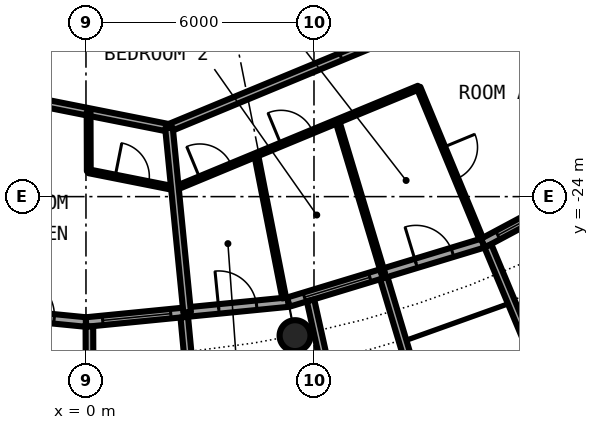
"""IFC4 building model, lengths in metres.
Left out: names, types, materials, properties, quantities, classifications, styles, units other than length and angle.
Written with IfcOpenShell. Run it as: python <this file> out.ifc"""

import sys

from ifc_helpers import new_model, si_unit, direction, frame, frame_2d, origin, origin_2d, place, context, subcontext, project, spatial, rectangle, hollow_circle, extrude, element, fill, save


model = new_model("IFC4")
c1 = context("Model", 3, precision=1e-05, world=origin(), true_north=direction((0.0, 1.0)))
c2 = subcontext(c1, "Body", "Model", "MODEL_VIEW")
j1 = project(units=[si_unit("LENGTHUNIT", "METRE"), si_unit("PLANEANGLEUNIT", "RADIAN")], contexts=[c1])
p1 = place(None, origin())
s1 = spatial("IfcSite", under=j1, at=p1, CompositionType="ELEMENT")
p2 = place(p1, origin())
s2 = spatial("IfcBuilding", under=s1, at=p2, CompositionType="ELEMENT")
p3 = place(p2, frame((0.0, 0.0, 145.2)))
s3 = spatial("IfcBuildingStorey", under=s2, at=p3, CompositionType="ELEMENT", Elevation=145.2)
p4 = place(p3, frame((5.501, -27.658, 0.0), z_axis=(0.0, 0.0, 1.0), x_axis=(1.0, 0.0, 0.0)))
e1 = element("IfcColumn", 1, at=p4, inside=s3, PredefinedType="COLUMN", context=c2, shape_type="SweptSolid", body=[
    extrude(hollow_circle(Radius=0.406, WallThickness=0.04, at=origin_2d()), origin(), (0.0, 0.0, 1.0), 3.05),
])
p5 = place(p3, frame((-5.326, -26.775, 0.0), z_axis=(0.0, 0.0, 1.0), x_axis=(0.995173996315, -0.098126026407, 0.0)))
e2 = element("IfcWall", 2, at=p5, inside=s3, PredefinedType="SOLIDWALL", context=c2, shape_type="SweptSolid", body=[
    extrude(rectangle(XDim=5.352, YDim=0.25, at=frame_2d((2.676, 0.0))), origin(), (0.0, 0.0, 1.0), 2.7),
])
p6 = place(p5, frame((0.441, 0.0, 0.3)))
e3 = element("IfcOpeningElement", 3, at=p6, cuts=e2, PredefinedType="OPENING", context=c2, shape_type="SweptSolid", body=[
    extrude(rectangle(XDim=1.8, YDim=2.1, at=frame_2d((0.9, 1.05))), frame((0.0, 0.135, 0.0), z_axis=(0.0, -1.0, 0.0), x_axis=(1.0, 0.0, 0.0)), (0.0, 0.0, 1.0), 0.27),
])
p7 = place(p5, frame((3.51, 0.0, 0.0)))
e4 = element("IfcOpeningElement", 4, at=p7, cuts=e2, PredefinedType="OPENING", context=c2, shape_type="SweptSolid", body=[
    extrude(rectangle(XDim=1.0, YDim=2.2, at=frame_2d((0.5, 1.1))), frame((0.0, 0.135, 0.0), z_axis=(0.0, -1.0, 0.0), x_axis=(1.0, 0.0, 0.0)), (0.0, 0.0, 1.0), 0.27),
])
p8 = place(p3, frame((0.0, -27.3, 0.0), z_axis=(0.0, 0.0, 1.0), x_axis=(0.995173996315, 0.098126026407, 0.0)))
e5 = element("IfcWall", 5, at=p8, inside=s3, PredefinedType="SOLIDWALL", context=c2, shape_type="SweptSolid", body=[
    extrude(rectangle(XDim=5.352, YDim=0.25, at=frame_2d((2.676, 0.0))), origin(), (0.0, 0.0, 1.0), 2.7),
])
p9 = place(p8, frame((0.441, 0.0, 0.3)))
e6 = element("IfcOpeningElement", 6, at=p9, cuts=e5, PredefinedType="OPENING", context=c2, shape_type="SweptSolid", body=[
    extrude(rectangle(XDim=1.8, YDim=2.1, at=frame_2d((0.9, 1.05))), frame((0.0, 0.135, 0.0), z_axis=(0.0, -1.0, 0.0), x_axis=(1.0, 0.0, 0.0)), (0.0, 0.0, 1.0), 0.27),
])
p10 = place(p8, frame((3.51, 0.0, 0.0)))
e7 = element("IfcOpeningElement", 7, at=p10, cuts=e5, PredefinedType="OPENING", context=c2, shape_type="SweptSolid", body=[
    extrude(rectangle(XDim=1.0, YDim=2.2, at=frame_2d((0.5, 1.1))), frame((0.0, 0.135, 0.0), z_axis=(0.0, -1.0, 0.0), x_axis=(1.0, 0.0, 0.0)), (0.0, 0.0, 1.0), 0.27),
])
p11 = place(p3, frame((0.09, -27.417, -0.03), z_axis=(0.0, 0.0, 1.0), x_axis=(0.00347308367, -0.999993968827, 0.0)))
e8 = element("IfcWall", 8, at=p11, inside=s3, PredefinedType="SOLIDWALL", context=c2, shape_type="SweptSolid", body=[
    extrude(rectangle(XDim=2.882, YDim=0.2, at=frame_2d((1.441, 0.0))), origin(), (0.0, 0.0, 1.0), 2.73),
])
p12 = place(p3, frame((2.586, -27.171, -0.03), z_axis=(0.0, 0.0, 1.0), x_axis=(0.094548432284, -0.995520262954, 0.0)))
e9 = element("IfcWall", 9, at=p12, inside=s3, PredefinedType="SOLIDWALL", context=c2, shape_type="SweptSolid", body=[
    extrude(rectangle(XDim=3.006, YDim=0.2, at=frame_2d((1.503, 0.0))), origin(), (0.0, 0.0, 1.0), 2.73),
])
p13 = place(p3, frame((5.326, -26.775, 0.0), z_axis=(0.0, 0.0, 1.0), x_axis=(0.956965678721, 0.290201119486, 0.0)))
e10 = element("IfcWall", 10, at=p13, inside=s3, PredefinedType="SOLIDWALL", context=c2, shape_type="SweptSolid", body=[
    extrude(rectangle(XDim=5.351, YDim=0.25, at=frame_2d((2.676, 0.0))), origin(), (0.0, 0.0, 1.0), 2.7),
])
p14 = place(p13, frame((0.441, 0.0, 0.3)))
e11 = element("IfcOpeningElement", 11, at=p14, cuts=e10, PredefinedType="OPENING", context=c2, shape_type="SweptSolid", body=[
    extrude(rectangle(XDim=1.8, YDim=2.1, at=frame_2d((0.9, 1.05))), frame((0.0, 0.135, 0.0), z_axis=(0.0, -1.0, 0.0), x_axis=(1.0, 0.0, 0.0)), (0.0, 0.0, 1.0), 0.27),
])
p15 = place(p13, frame((3.51, 0.0, 0.0)))
e12 = element("IfcOpeningElement", 12, at=p15, cuts=e10, PredefinedType="OPENING", context=c2, shape_type="SweptSolid", body=[
    extrude(rectangle(XDim=1.0, YDim=2.2, at=frame_2d((0.5, 1.1))), frame((0.0, 0.135, 0.0), z_axis=(0.0, -1.0, 0.0), x_axis=(1.0, 0.0, 0.0)), (0.0, 0.0, 1.0), 0.27),
])
p16 = place(p3, frame((5.909, -26.729, -0.03), z_axis=(0.0, 0.0, 1.0), x_axis=(0.216409053917, -0.976302781612, 0.0)))
e13 = element("IfcWall", 13, at=p16, inside=s3, PredefinedType="SOLIDWALL", context=c2, shape_type="SweptSolid", body=[
    extrude(rectangle(XDim=2.925, YDim=0.2, at=frame_2d((1.463, 0.0))), origin(), (0.0, 0.0, 1.0), 2.73),
])
p17 = place(p3, frame((7.837, -26.144, -0.03), z_axis=(0.0, 0.0, 1.0), x_axis=(0.287064767992, -0.957911174889, 0.0)))
e14 = element("IfcWall", 14, at=p17, inside=s3, PredefinedType="SOLIDWALL", context=c2, shape_type="SweptSolid", body=[
    extrude(rectangle(XDim=3.006, YDim=0.2, at=frame_2d((1.503, 0.0))), origin(), (0.0, 0.0, 1.0), 2.73),
])
p18 = place(p3, frame((10.447, -25.222, 0.0), z_axis=(0.0, 0.0, 1.0), x_axis=(0.881915646801, 0.471407246368, 0.0)))
e15 = element("IfcWall", 15, at=p18, inside=s3, PredefinedType="SOLIDWALL", context=c2, shape_type="SweptSolid", body=[
    extrude(rectangle(XDim=5.352, YDim=0.25, at=frame_2d((2.676, 0.0))), origin(), (0.0, 0.0, 1.0), 2.7),
])
p19 = place(p18, frame((0.441, 0.0, 0.3)))
e16 = element("IfcOpeningElement", 16, at=p19, cuts=e15, PredefinedType="OPENING", context=c2, shape_type="SweptSolid", body=[
    extrude(rectangle(XDim=1.8, YDim=2.1, at=frame_2d((0.9, 1.05))), frame((0.0, 0.135, 0.0), z_axis=(0.0, -1.0, 0.0), x_axis=(1.0, 0.0, 0.0)), (0.0, 0.0, 1.0), 0.27),
])
p20 = place(p18, frame((3.51, 0.0, 0.0)))
e17 = element("IfcOpeningElement", 17, at=p20, cuts=e15, PredefinedType="OPENING", context=c2, shape_type="SweptSolid", body=[
    extrude(rectangle(XDim=1.0, YDim=2.2, at=frame_2d((0.5, 1.1))), frame((0.0, 0.135, 0.0), z_axis=(0.0, -1.0, 0.0), x_axis=(1.0, 0.0, 0.0)), (0.0, 0.0, 1.0), 0.27),
])
p21 = place(p3, frame((10.575, -25.295, -0.03), z_axis=(0.0, 0.0, 1.0), x_axis=(0.385697364644, -0.922625353492, 0.0)))
e18 = element("IfcWall", 18, at=p21, inside=s3, PredefinedType="SOLIDWALL", context=c2, shape_type="SweptSolid", body=[
    extrude(rectangle(XDim=2.883, YDim=0.2, at=frame_2d((1.442, 0.0))), origin(), (0.0, 0.0, 1.0), 2.73),
])
p22 = place(p3, frame((0.074, -23.334, 0.0), z_axis=(0.0, 0.0, 1.0), x_axis=(0.98081942231, -0.194918600496, 0.0)))
e19 = element("IfcWall", 19, at=p22, inside=s3, PredefinedType="PARTITIONING", context=c2, shape_type="SweptSolid", body=[
    extrude(rectangle(XDim=2.313, YDim=0.1, at=frame_2d((1.157, 0.0))), origin(), (0.0, 0.0, 1.0), 2.7),
])
p23 = place(p22, frame((0.707, 0.0, 0.0)))
e20 = element("IfcOpeningElement", 20, at=p23, cuts=e19, PredefinedType="OPENING", context=c2, shape_type="SweptSolid", body=[
    extrude(rectangle(XDim=0.9, YDim=2.3, at=frame_2d((0.45, 1.15))), frame((0.0, 0.06, 0.0), z_axis=(0.0, -1.0, 0.0), x_axis=(1.0, 0.0, 0.0)), (0.0, 0.0, 1.0), 0.12),
])
p24 = place(p3, frame((2.342, -23.785, 0.0), z_axis=(0.0, 0.0, 1.0), x_axis=(0.92388173557, 0.382678113667, 0.0)))
e21 = element("IfcWall", 21, at=p24, inside=s3, PredefinedType="PARTITIONING", context=c2, shape_type="SweptSolid", body=[
    extrude(rectangle(XDim=6.938, YDim=0.1, at=frame_2d((3.469, 0.0))), origin(), (0.0, 0.0, 1.0), 2.7),
])
p25 = place(p24, frame((3.021, 0.0, 0.0)))
e22 = element("IfcOpeningElement", 22, at=p25, cuts=e21, PredefinedType="OPENING", context=c2, shape_type="SweptSolid", body=[
    extrude(rectangle(XDim=0.9, YDim=2.3, at=frame_2d((0.45, 1.15))), frame((0.0, 0.06, 0.0), z_axis=(0.0, -1.0, 0.0), x_axis=(1.0, 0.0, 0.0)), (0.0, 0.0, 1.0), 0.12),
])
p26 = place(p24, frame((0.707, 0.0, 0.0)))
e23 = element("IfcOpeningElement", 23, at=p26, cuts=e21, PredefinedType="OPENING", context=c2, shape_type="SweptSolid", body=[
    extrude(rectangle(XDim=0.9, YDim=2.3, at=frame_2d((0.45, 1.15))), frame((0.0, 0.06, 0.0), z_axis=(0.0, -1.0, 0.0), x_axis=(1.0, 0.0, 0.0)), (0.0, 0.0, 1.0), 0.12),
])
p27 = place(p3, frame((-10.512, -19.667, 0.0), z_axis=(0.0, 0.0, 1.0), x_axis=(0.980780341017, -0.195115152343, 0.0)))
e24 = element("IfcWall", 24, at=p27, inside=s3, PredefinedType="PARTITIONING", context=c2, shape_type="SweptSolid", body=[
    extrude(rectangle(XDim=12.947, YDim=0.2, at=frame_2d((6.473, 0.0))), origin(), (0.0, 0.0, 1.0), 2.7),
])
p28 = place(p27, frame((4.894, 0.0, 0.0)))
e25 = element("IfcOpeningElement", 25, at=p28, cuts=e24, PredefinedType="OPENING", context=c2, shape_type="SweptSolid", body=[
    extrude(rectangle(XDim=1.0, YDim=2.3, at=frame_2d((0.5, 1.15))), frame((0.0, 0.11, 0.0), z_axis=(0.0, -1.0, 0.0), x_axis=(1.0, 0.0, 0.0)), (0.0, 0.0, 1.0), 0.22),
])
p29 = place(p3, frame((2.186, -22.193, 0.0), z_axis=(0.0, 0.0, 1.0), x_axis=(0.923860535822, 0.382729291212, 0.0)))
e26 = element("IfcWall", 26, at=p29, inside=s3, PredefinedType="PARTITIONING", context=c2, shape_type="SweptSolid", body=[
    extrude(rectangle(XDim=12.947, YDim=0.2, at=frame_2d((6.473, 0.0))), origin(), (0.0, 0.0, 1.0), 2.7),
])
p30 = place(p29, frame((4.894, 0.0, 0.0)))
e27 = element("IfcOpeningElement", 27, at=p30, cuts=e26, PredefinedType="OPENING", context=c2, shape_type="SweptSolid", body=[
    extrude(rectangle(XDim=1.0, YDim=2.3, at=frame_2d((0.5, 1.15))), frame((0.0, 0.11, 0.0), z_axis=(0.0, -1.0, 0.0), x_axis=(1.0, 0.0, 0.0)), (0.0, 0.0, 1.0), 0.22),
])
p31 = place(p3, frame((0.074, -23.334, 0.0), z_axis=(0.0, 0.0, 1.0), x_axis=(-0.003125961595, 0.99999511417, 0.0)))
e28 = element("IfcWall", 28, at=p31, inside=s3, PredefinedType="PARTITIONING", context=c2, shape_type="SweptSolid", body=[
    extrude(rectangle(XDim=1.562, YDim=0.1, at=frame_2d((0.781, 0.0))), origin(), (0.0, 0.0, 1.0), 2.7),
])
p32 = place(p3, frame((2.184, -22.193, 0.0), z_axis=(0.0, 0.0, 1.0), x_axis=(0.098070432075, -0.995179476453, 0.0)))
e29 = element("IfcWall", 29, at=p32, inside=s3, PredefinedType="PARTITIONING", context=c2, shape_type="SweptSolid", body=[
    extrude(rectangle(XDim=4.874, YDim=0.2, at=frame_2d((2.437, 0.0))), origin(), (0.0, 0.0, 1.0), 2.7),
])
p33 = place(p3, frame((4.479, -22.9, 0.0), z_axis=(0.0, 0.0, 1.0), x_axis=(0.192118055779, -0.981371821811, 0.0)))
e30 = element("IfcWall", 30, at=p33, inside=s3, PredefinedType="PARTITIONING", context=c2, shape_type="SweptSolid", body=[
    extrude(rectangle(XDim=3.842, YDim=0.1, at=frame_2d((1.921, 0.0))), origin(), (0.0, 0.0, 1.0), 2.7),
])
p34 = place(p3, frame((6.616, -22.015, 0.0), z_axis=(0.0, 0.0, 1.0), x_axis=(0.287802539521, -0.957689771401, 0.0)))
e31 = element("IfcWall", 31, at=p34, inside=s3, PredefinedType="PARTITIONING", context=c2, shape_type="SweptSolid", body=[
    extrude(rectangle(XDim=4.187, YDim=0.1, at=frame_2d((2.094, 0.0))), origin(), (0.0, 0.0, 1.0), 2.7),
])
p35 = place(p3, frame((8.752, -21.13, 0.0), z_axis=(0.0, 0.0, 1.0), x_axis=(0.382689142274, -0.923877167369, 0.0)))
e32 = element("IfcWall", 32, at=p35, inside=s3, PredefinedType="PARTITIONING", context=c2, shape_type="SweptSolid", body=[
    extrude(rectangle(XDim=4.304, YDim=0.1, at=frame_2d((2.152, 0.0))), origin(), (0.0, 0.0, 1.0), 2.7),
])
p36 = place(p35, frame((1.702, 0.0, 0.0)))
e33 = element("IfcOpeningElement", 33, at=p36, cuts=e32, PredefinedType="OPENING", context=c2, shape_type="SweptSolid", body=[
    extrude(rectangle(XDim=0.9, YDim=2.3, at=frame_2d((0.45, 1.15))), frame((0.0, 0.06, 0.0), z_axis=(0.0, -1.0, 0.0), x_axis=(1.0, 0.0, 0.0)), (0.0, 0.0, 1.0), 0.12),
])
p37 = place(p7, origin())
e34 = element("IfcDoor", 34, at=p37, inside=s3, OperationType="SINGLE_SWING_LEFT", PredefinedType="DOOR", context=c2, shape_type="SweptSolid", body=[
    extrude(rectangle(XDim=1.0, YDim=2.2, at=frame_2d((0.5, 1.1))), frame((0.0, 0.025, 0.0), z_axis=(0.0, -1.0, 0.0), x_axis=(1.0, 0.0, 0.0)), (0.0, 0.0, 1.0), 0.05),
])
fill(e4, e34)
p38 = place(p9, origin())
e35 = element("IfcWindow", 35, at=p38, inside=s3, PartitioningType="SINGLE_PANEL", PredefinedType="WINDOW", context=c2, shape_type="SweptSolid", body=[
    extrude(rectangle(XDim=1.8, YDim=2.1, at=frame_2d((0.9, 1.05))), frame((0.0, 0.03, 0.0), z_axis=(0.0, -1.0, 0.0), x_axis=(1.0, 0.0, 0.0)), (0.0, 0.0, 1.0), 0.06),
])
fill(e6, e35)
p39 = place(p10, origin())
e36 = element("IfcDoor", 36, at=p39, inside=s3, OperationType="SINGLE_SWING_LEFT", PredefinedType="DOOR", context=c2, shape_type="SweptSolid", body=[
    extrude(rectangle(XDim=1.0, YDim=2.2, at=frame_2d((0.5, 1.1))), frame((0.0, 0.025, 0.0), z_axis=(0.0, -1.0, 0.0), x_axis=(1.0, 0.0, 0.0)), (0.0, 0.0, 1.0), 0.05),
])
fill(e7, e36)
p40 = place(p14, origin())
e37 = element("IfcWindow", 37, at=p40, inside=s3, PartitioningType="SINGLE_PANEL", PredefinedType="WINDOW", context=c2, shape_type="SweptSolid", body=[
    extrude(rectangle(XDim=1.8, YDim=2.1, at=frame_2d((0.9, 1.05))), frame((0.0, 0.03, 0.0), z_axis=(0.0, -1.0, 0.0), x_axis=(1.0, 0.0, 0.0)), (0.0, 0.0, 1.0), 0.06),
])
fill(e11, e37)
p41 = place(p15, origin())
e38 = element("IfcDoor", 38, at=p41, inside=s3, OperationType="SINGLE_SWING_LEFT", PredefinedType="DOOR", context=c2, shape_type="SweptSolid", body=[
    extrude(rectangle(XDim=1.0, YDim=2.2, at=frame_2d((0.5, 1.1))), frame((0.0, 0.025, 0.0), z_axis=(0.0, -1.0, 0.0), x_axis=(1.0, 0.0, 0.0)), (0.0, 0.0, 1.0), 0.05),
])
fill(e12, e38)
p42 = place(p19, origin())
e39 = element("IfcWindow", 39, at=p42, inside=s3, PartitioningType="SINGLE_PANEL", PredefinedType="WINDOW", context=c2, shape_type="SweptSolid", body=[
    extrude(rectangle(XDim=1.8, YDim=2.1, at=frame_2d((0.9, 1.05))), frame((0.0, 0.03, 0.0), z_axis=(0.0, -1.0, 0.0), x_axis=(1.0, 0.0, 0.0)), (0.0, 0.0, 1.0), 0.06),
])
fill(e16, e39)
p43 = place(p23, origin())
e40 = element("IfcDoor", 40, at=p43, inside=s3, OperationType="SINGLE_SWING_RIGHT", PredefinedType="DOOR", context=c2, shape_type="SweptSolid", body=[
    extrude(rectangle(XDim=0.9, YDim=2.3, at=frame_2d((0.45, 1.15))), frame((0.0, 0.025, 0.0), z_axis=(0.0, -1.0, 0.0), x_axis=(1.0, 0.0, 0.0)), (0.0, 0.0, 1.0), 0.05),
])
fill(e20, e40)
p44 = place(p30, origin())
e41 = element("IfcDoor", 41, at=p44, inside=s3, OperationType="SINGLE_SWING_LEFT", PredefinedType="DOOR", context=c2, shape_type="SweptSolid", body=[
    extrude(rectangle(XDim=1.0, YDim=2.3, at=frame_2d((0.5, 1.15))), frame((0.0, 0.025, 0.0), z_axis=(0.0, -1.0, 0.0), x_axis=(1.0, 0.0, 0.0)), (0.0, 0.0, 1.0), 0.05),
])
fill(e27, e41)
p45 = place(p36, origin())
e42 = element("IfcDoor", 42, at=p45, inside=s3, OperationType="SINGLE_SWING_RIGHT", PredefinedType="DOOR", context=c2, shape_type="SweptSolid", body=[
    extrude(rectangle(XDim=0.9, YDim=2.3, at=frame_2d((0.45, 1.15))), frame((0.0, 0.025, 0.0), z_axis=(0.0, -1.0, 0.0), x_axis=(1.0, 0.0, 0.0)), (0.0, 0.0, 1.0), 0.05),
])
fill(e33, e42)
p46 = place(p25, origin())
e43 = element("IfcDoor", 43, at=p46, inside=s3, OperationType="SINGLE_SWING_RIGHT", PredefinedType="DOOR", context=c2, shape_type="SweptSolid", body=[
    extrude(rectangle(XDim=0.9, YDim=2.3, at=frame_2d((0.45, 1.15))), frame((0.0, 0.025, 0.0), z_axis=(0.0, -1.0, 0.0), x_axis=(1.0, 0.0, 0.0)), (0.0, 0.0, 1.0), 0.05),
])
fill(e22, e43)
p47 = place(p26, origin())
e44 = element("IfcDoor", 44, at=p47, inside=s3, OperationType="SINGLE_SWING_LEFT", PredefinedType="DOOR", context=c2, shape_type="SweptSolid", body=[
    extrude(rectangle(XDim=0.9, YDim=2.3, at=frame_2d((0.45, 1.15))), frame((0.0, 0.025, 0.0), z_axis=(0.0, -1.0, 0.0), x_axis=(1.0, 0.0, 0.0)), (0.0, 0.0, 1.0), 0.05),
])
fill(e23, e44)
save(model, sys.argv[1])
